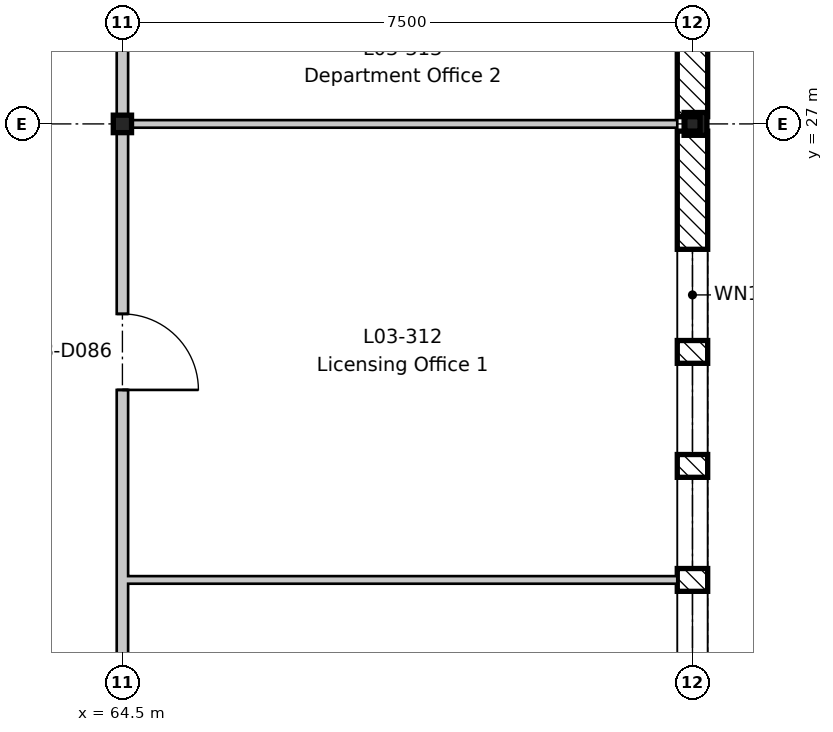
"""IFC4 building model, lengths in metres.
Left out: names, types, materials, properties, quantities, classifications, styles, units other than length and angle.
Written with IfcOpenShell. Run it as: python <this file> out.ifc"""

import sys

from ifc_helpers import new_model, si_unit, direction, frame, frame_2d, origin, origin_2d, place, context, subcontext, project, spatial, rectangle, i_section, extrude, element, fill, save


model = new_model("IFC4")
c1 = context("Model", 3, precision=1e-05, world=origin(), true_north=direction((0.0, 1.0)))
c2 = subcontext(c1, "Body", "Model", "MODEL_VIEW")
j1 = project(units=[si_unit("LENGTHUNIT", "METRE"), si_unit("PLANEANGLEUNIT", "RADIAN")], contexts=[c1])
p1 = place(None, origin())
s1 = spatial("IfcSite", under=j1, at=p1, CompositionType="ELEMENT")
p2 = place(p1, origin())
s2 = spatial("IfcBuilding", under=s1, at=p2, CompositionType="ELEMENT")
p3 = place(p2, frame((0.0, 0.0, 14.4)))
s3 = spatial("IfcBuildingStorey", under=s2, at=p3, CompositionType="ELEMENT", Elevation=14.4)
p4 = place(p3, frame((64.5, 27.0, -0.2), z_axis=(0.0, 0.0, 1.0), x_axis=(1.0, 0.0, 0.0)))
e1 = element("IfcColumn", 1, at=p4, inside=s3, PredefinedType="COLUMN", context=c2, shape_type="SweptSolid", body=[
    extrude(i_section(OverallWidth=0.24, OverallDepth=0.23, WebThickness=0.008, FlangeThickness=0.012, FilletRadius=0.021, at=origin_2d()), origin(), (0.0, 0.0, 1.0), 4.15),
])
p5 = place(p3, frame((72.0, 27.0, -0.2), z_axis=(0.0, 0.0, 1.0), x_axis=(1.0, 0.0, 0.0)))
e2 = element("IfcColumn", 2, at=p5, inside=s3, PredefinedType="COLUMN", context=c2, shape_type="SweptSolid", body=[
    extrude(i_section(OverallWidth=0.2, OverallDepth=0.19, WebThickness=0.007, FlangeThickness=0.01, FilletRadius=0.018, at=origin_2d()), origin(), (0.0, 0.0, 1.0), 4.15),
])
p6 = place(p3, frame((72.04, 27.0, 3.95), z_axis=(0.0, 0.0, 1.0), x_axis=(1.0, 0.0, 0.0)))
e3 = element("IfcColumn", 3, at=p6, inside=s3, PredefinedType="COLUMN", context=c2, shape_type="SweptSolid", body=[
    extrude(i_section(OverallWidth=0.3, OverallDepth=0.3, WebThickness=0.011, FlangeThickness=0.019, FilletRadius=0.027, at=origin_2d()), origin(), (0.0, 0.0, 1.0), 0.25),
])
p7 = place(p3, frame((72.0, 26.905, 0.0), z_axis=(0.0, 0.0, 1.0), x_axis=(0.0, -1.0, 0.0)))
e4 = element("IfcWall", 4, at=p7, inside=s3, PredefinedType="STANDARD", context=c2, shape_type="SweptSolid", body=[
    extrude(rectangle(XDim=8.81, YDim=0.4, at=frame_2d((4.405, 0.0))), origin(), (0.0, 0.0, 1.0), 3.55),
])
p8 = place(p7, frame((6.055, 0.0, 0.6)))
e5 = element("IfcOpeningElement", 5, at=p8, cuts=e4, PredefinedType="OPENING", context=c2, shape_type="SweptSolid", body=[
    extrude(rectangle(XDim=1.2, YDim=1.8, at=frame_2d((0.6, 0.9))), frame((0.0, 0.21, 0.0), z_axis=(0.0, -1.0, 0.0), x_axis=(1.0, 0.0, 0.0)), (0.0, 0.0, 1.0), 0.42),
])
p9 = place(p7, frame((4.555, 0.0, 0.6)))
e6 = element("IfcOpeningElement", 6, at=p9, cuts=e4, PredefinedType="OPENING", context=c2, shape_type="SweptSolid", body=[
    extrude(rectangle(XDim=1.2, YDim=1.8, at=frame_2d((0.6, 0.9))), frame((0.0, 0.21, 0.0), z_axis=(0.0, -1.0, 0.0), x_axis=(1.0, 0.0, 0.0)), (0.0, 0.0, 1.0), 0.42),
])
p10 = place(p7, frame((3.055, 0.0, 0.6)))
e7 = element("IfcOpeningElement", 7, at=p10, cuts=e4, PredefinedType="OPENING", context=c2, shape_type="SweptSolid", body=[
    extrude(rectangle(XDim=1.2, YDim=1.8, at=frame_2d((0.6, 0.9))), frame((0.0, 0.21, 0.0), z_axis=(0.0, -1.0, 0.0), x_axis=(1.0, 0.0, 0.0)), (0.0, 0.0, 1.0), 0.42),
])
p11 = place(p7, frame((1.555, 0.0, 0.6)))
e8 = element("IfcOpeningElement", 8, at=p11, cuts=e4, PredefinedType="OPENING", context=c2, shape_type="SweptSolid", body=[
    extrude(rectangle(XDim=1.2, YDim=1.8, at=frame_2d((0.6, 0.9))), frame((0.0, 0.21, 0.0), z_axis=(0.0, -1.0, 0.0), x_axis=(1.0, 0.0, 0.0)), (0.0, 0.0, 1.0), 0.42),
])
p12 = place(p3, frame((72.0, 35.905, 0.0), z_axis=(0.0, 0.0, 1.0), x_axis=(0.0, -1.0, 0.0)))
e9 = element("IfcWall", 9, at=p12, inside=s3, PredefinedType="STANDARD", context=c2, shape_type="SweptSolid", body=[
    extrude(rectangle(XDim=8.81, YDim=0.4, at=frame_2d((4.405, 0.0))), origin(), (0.0, 0.0, 1.0), 3.55),
])
p13 = place(p12, frame((6.055, 0.0, 0.6)))
e10 = element("IfcOpeningElement", 10, at=p13, cuts=e9, PredefinedType="OPENING", context=c2, shape_type="SweptSolid", body=[
    extrude(rectangle(XDim=1.2, YDim=1.8, at=frame_2d((0.6, 0.9))), frame((0.0, 0.21, 0.0), z_axis=(0.0, -1.0, 0.0), x_axis=(1.0, 0.0, 0.0)), (0.0, 0.0, 1.0), 0.42),
])
p14 = place(p12, frame((4.555, 0.0, 0.6)))
e11 = element("IfcOpeningElement", 11, at=p14, cuts=e9, PredefinedType="OPENING", context=c2, shape_type="SweptSolid", body=[
    extrude(rectangle(XDim=1.2, YDim=1.8, at=frame_2d((0.6, 0.9))), frame((0.0, 0.21, 0.0), z_axis=(0.0, -1.0, 0.0), x_axis=(1.0, 0.0, 0.0)), (0.0, 0.0, 1.0), 0.42),
])
p15 = place(p12, frame((3.055, 0.0, 0.6)))
e12 = element("IfcOpeningElement", 12, at=p15, cuts=e9, PredefinedType="OPENING", context=c2, shape_type="SweptSolid", body=[
    extrude(rectangle(XDim=1.2, YDim=1.8, at=frame_2d((0.6, 0.9))), frame((0.0, 0.21, 0.0), z_axis=(0.0, -1.0, 0.0), x_axis=(1.0, 0.0, 0.0)), (0.0, 0.0, 1.0), 0.42),
])
p16 = place(p12, frame((1.555, 0.0, 0.6)))
e13 = element("IfcOpeningElement", 13, at=p16, cuts=e9, PredefinedType="OPENING", context=c2, shape_type="SweptSolid", body=[
    extrude(rectangle(XDim=1.2, YDim=1.8, at=frame_2d((0.6, 0.9))), frame((0.0, 0.21, 0.0), z_axis=(0.0, -1.0, 0.0), x_axis=(1.0, 0.0, 0.0)), (0.0, 0.0, 1.0), 0.42),
])
p17 = place(p3, frame((64.575, 21.0, 0.0), z_axis=(0.0, 0.0, 1.0), x_axis=(1.0, 0.0, 0.0)))
e14 = element("IfcWall", 14, at=p17, inside=s3, PredefinedType="PARTITIONING", context=c2, shape_type="SweptSolid", body=[
    extrude(rectangle(XDim=7.225, YDim=0.1, at=frame_2d((3.613, 0.0))), origin(), (0.0, 0.0, 1.0), 3.95),
])
p18 = place(p3, frame((64.575, 27.0, 0.0), z_axis=(0.0, 0.0, 1.0), x_axis=(1.0, 0.0, 0.0)))
e15 = element("IfcWall", 15, at=p18, inside=s3, PredefinedType="PARTITIONING", context=c2, shape_type="SweptSolid", body=[
    extrude(rectangle(XDim=7.225, YDim=0.1, at=frame_2d((3.613, 0.0))), origin(), (0.0, 0.0, 1.0), 3.6),
])
p19 = place(p3, frame((64.5, 0.2, 0.0), z_axis=(0.0, 0.0, 1.0), x_axis=(0.0, 1.0, 0.0)))
e16 = element("IfcWall", 16, at=p19, inside=s3, PredefinedType="PARTITIONING", context=c2, shape_type="SweptSolid", body=[
    extrude(rectangle(XDim=53.6, YDim=0.15, at=frame_2d((26.8, 0.0))), origin(), (0.0, 0.0, 1.0), 3.43),
])
p20 = place(p19, frame((2.3, 0.0, 0.0)))
e17 = element("IfcOpeningElement", 17, at=p20, cuts=e16, PredefinedType="OPENING", context=c2, shape_type="SweptSolid", body=[
    extrude(rectangle(XDim=1.0, YDim=2.1, at=frame_2d((0.5, 1.05))), frame((0.0, 0.085, 0.0), z_axis=(0.0, -1.0, 0.0), x_axis=(1.0, 0.0, 0.0)), (0.0, 0.0, 1.0), 0.17),
])
p21 = place(p19, frame((6.8, 0.0, 0.0)))
e18 = element("IfcOpeningElement", 18, at=p21, cuts=e16, PredefinedType="OPENING", context=c2, shape_type="SweptSolid", body=[
    extrude(rectangle(XDim=1.0, YDim=2.1, at=frame_2d((0.5, 1.05))), frame((0.0, 0.085, 0.0), z_axis=(0.0, -1.0, 0.0), x_axis=(1.0, 0.0, 0.0)), (0.0, 0.0, 1.0), 0.17),
])
p22 = place(p19, frame((12.6, 0.0, 0.0)))
e19 = element("IfcOpeningElement", 19, at=p22, cuts=e16, PredefinedType="OPENING", context=c2, shape_type="SweptSolid", body=[
    extrude(rectangle(XDim=1.4, YDim=2.1, at=frame_2d((0.7, 1.05))), frame((0.0, 0.085, 0.0), z_axis=(0.0, -1.0, 0.0), x_axis=(1.0, 0.0, 0.0)), (0.0, 0.0, 1.0), 0.17),
])
p23 = place(p19, frame((18.8, 0.0, 0.0)))
e20 = element("IfcOpeningElement", 20, at=p23, cuts=e16, PredefinedType="OPENING", context=c2, shape_type="SweptSolid", body=[
    extrude(rectangle(XDim=1.0, YDim=2.1, at=frame_2d((0.5, 1.05))), frame((0.0, 0.085, 0.0), z_axis=(0.0, -1.0, 0.0), x_axis=(1.0, 0.0, 0.0)), (0.0, 0.0, 1.0), 0.17),
])
p24 = place(p19, frame((23.3, 0.0, 0.0)))
e21 = element("IfcOpeningElement", 21, at=p24, cuts=e16, PredefinedType="OPENING", context=c2, shape_type="SweptSolid", body=[
    extrude(rectangle(XDim=1.0, YDim=2.1, at=frame_2d((0.5, 1.05))), frame((0.0, 0.085, 0.0), z_axis=(0.0, -1.0, 0.0), x_axis=(1.0, 0.0, 0.0)), (0.0, 0.0, 1.0), 0.17),
])
p25 = place(p19, frame((27.8, 0.0, 0.0)))
e22 = element("IfcOpeningElement", 22, at=p25, cuts=e16, PredefinedType="OPENING", context=c2, shape_type="SweptSolid", body=[
    extrude(rectangle(XDim=1.0, YDim=2.1, at=frame_2d((0.5, 1.05))), frame((0.0, 0.085, 0.0), z_axis=(0.0, -1.0, 0.0), x_axis=(1.0, 0.0, 0.0)), (0.0, 0.0, 1.0), 0.17),
])
p26 = place(p19, frame((30.8, 0.0, 0.0)))
e23 = element("IfcOpeningElement", 23, at=p26, cuts=e16, PredefinedType="OPENING", context=c2, shape_type="SweptSolid", body=[
    extrude(rectangle(XDim=1.0, YDim=2.1, at=frame_2d((0.5, 1.05))), frame((0.0, 0.085, 0.0), z_axis=(0.0, -1.0, 0.0), x_axis=(1.0, 0.0, 0.0)), (0.0, 0.0, 1.0), 0.17),
])
p27 = place(p19, frame((33.8, 0.0, 0.0)))
e24 = element("IfcOpeningElement", 24, at=p27, cuts=e16, PredefinedType="OPENING", context=c2, shape_type="SweptSolid", body=[
    extrude(rectangle(XDim=1.0, YDim=2.1, at=frame_2d((0.5, 1.05))), frame((0.0, 0.085, 0.0), z_axis=(0.0, -1.0, 0.0), x_axis=(1.0, 0.0, 0.0)), (0.0, 0.0, 1.0), 0.17),
])
p28 = place(p19, frame((38.3, 0.0, 0.0)))
e25 = element("IfcOpeningElement", 25, at=p28, cuts=e16, PredefinedType="OPENING", context=c2, shape_type="SweptSolid", body=[
    extrude(rectangle(XDim=1.0, YDim=2.1, at=frame_2d((0.5, 1.05))), frame((0.0, 0.085, 0.0), z_axis=(0.0, -1.0, 0.0), x_axis=(1.0, 0.0, 0.0)), (0.0, 0.0, 1.0), 0.17),
])
p29 = place(p19, frame((42.8, 0.0, 0.0)))
e26 = element("IfcOpeningElement", 26, at=p29, cuts=e16, PredefinedType="OPENING", context=c2, shape_type="SweptSolid", body=[
    extrude(rectangle(XDim=1.0, YDim=2.1, at=frame_2d((0.5, 1.05))), frame((0.0, 0.085, 0.0), z_axis=(0.0, -1.0, 0.0), x_axis=(1.0, 0.0, 0.0)), (0.0, 0.0, 1.0), 0.17),
])
p30 = place(p19, frame((48.6, 0.0, 0.0)))
e27 = element("IfcOpeningElement", 27, at=p30, cuts=e16, PredefinedType="OPENING", context=c2, shape_type="SweptSolid", body=[
    extrude(rectangle(XDim=1.4, YDim=2.1, at=frame_2d((0.7, 1.05))), frame((0.0, 0.085, 0.0), z_axis=(0.0, -1.0, 0.0), x_axis=(1.0, 0.0, 0.0)), (0.0, 0.0, 1.0), 0.17),
])
p31 = place(p8, origin())
e28 = element("IfcWindow", 28, at=p31, inside=s3, PartitioningType="SINGLE_PANEL", PredefinedType="WINDOW", context=c2, shape_type="SweptSolid", body=[
    extrude(rectangle(XDim=1.2, YDim=1.8, at=frame_2d((0.6, 0.9))), frame((0.0, 0.03, 0.0), z_axis=(0.0, -1.0, 0.0), x_axis=(1.0, 0.0, 0.0)), (0.0, 0.0, 1.0), 0.06),
])
fill(e5, e28)
p32 = place(p9, origin())
e29 = element("IfcWindow", 29, at=p32, inside=s3, PartitioningType="SINGLE_PANEL", PredefinedType="WINDOW", context=c2, shape_type="SweptSolid", body=[
    extrude(rectangle(XDim=1.2, YDim=1.8, at=frame_2d((0.6, 0.9))), frame((0.0, 0.03, 0.0), z_axis=(0.0, -1.0, 0.0), x_axis=(1.0, 0.0, 0.0)), (0.0, 0.0, 1.0), 0.06),
])
fill(e6, e29)
p33 = place(p10, origin())
e30 = element("IfcWindow", 30, at=p33, inside=s3, PartitioningType="SINGLE_PANEL", PredefinedType="WINDOW", context=c2, shape_type="SweptSolid", body=[
    extrude(rectangle(XDim=1.2, YDim=1.8, at=frame_2d((0.6, 0.9))), frame((0.0, 0.03, 0.0), z_axis=(0.0, -1.0, 0.0), x_axis=(1.0, 0.0, 0.0)), (0.0, 0.0, 1.0), 0.06),
])
fill(e7, e30)
p34 = place(p11, origin())
e31 = element("IfcWindow", 31, at=p34, inside=s3, PartitioningType="SINGLE_PANEL", PredefinedType="WINDOW", context=c2, shape_type="SweptSolid", body=[
    extrude(rectangle(XDim=1.2, YDim=1.8, at=frame_2d((0.6, 0.9))), frame((0.0, 0.03, 0.0), z_axis=(0.0, -1.0, 0.0), x_axis=(1.0, 0.0, 0.0)), (0.0, 0.0, 1.0), 0.06),
])
fill(e8, e31)
p35 = place(p24, frame((1.0, 0.0, 0.0), z_axis=(0.0, 0.0, 1.0), x_axis=(-1.0, 0.0, 0.0)))
e32 = element("IfcDoor", 32, at=p35, inside=s3, OperationType="SINGLE_SWING_RIGHT", PredefinedType="DOOR", context=c2, shape_type="SweptSolid", body=[
    extrude(rectangle(XDim=1.0, YDim=2.1, at=frame_2d((0.5, 1.05))), frame((0.0, 0.025, 0.0), z_axis=(0.0, -1.0, 0.0), x_axis=(1.0, 0.0, 0.0)), (0.0, 0.0, 1.0), 0.05),
])
fill(e21, e32)
save(model, sys.argv[1])
